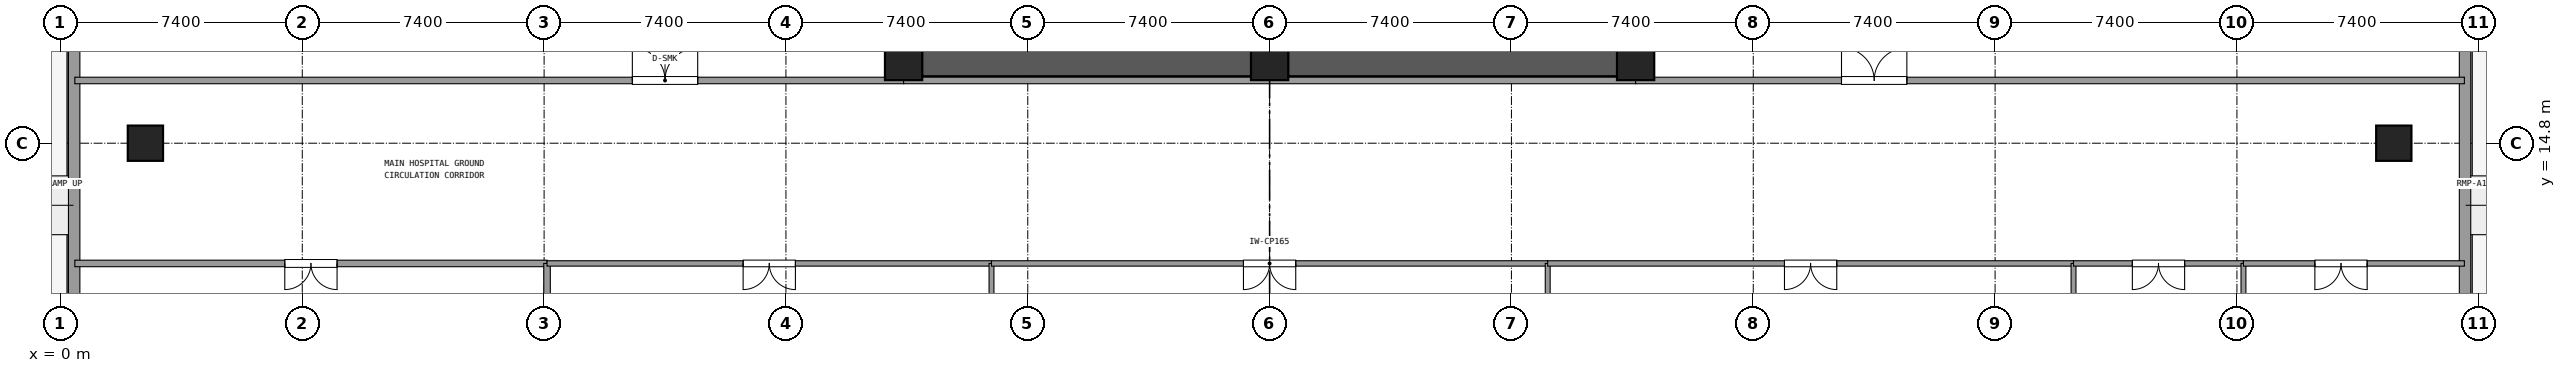
"""IFC4 building model, lengths in metres.
Left out: names, types, materials, properties, quantities, classifications, styles, units other than length and angle.
Written with IfcOpenShell. Run it as: python <this file> out.ifc"""

import sys

from ifc_helpers import new_model, si_unit, direction, frame, frame_2d, origin, origin_2d, place, context, subcontext, project, spatial, rectangle, extrude, element, fill, save


model = new_model("IFC4")
c1 = context("Model", 3, precision=1e-05, world=origin(), true_north=direction((0.0, 1.0)))
c2 = subcontext(c1, "Body", "Model", "MODEL_VIEW")
j1 = project(units=[si_unit("LENGTHUNIT", "METRE"), si_unit("PLANEANGLEUNIT", "RADIAN")], contexts=[c1])
p1 = place(None, origin())
s1 = spatial("IfcSite", under=j1, at=p1, CompositionType="ELEMENT")
p2 = place(p1, origin())
s2 = spatial("IfcBuilding", under=s1, at=p2, CompositionType="ELEMENT")
p3 = place(p2, origin())
s3 = spatial("IfcBuildingStorey", under=s2, at=p3, CompositionType="ELEMENT", Elevation=0.0)
for number, where, z_axis, x_axis in (
    (1, (25.8, 17.3, 0.0), (0.0, 0.0, 1.0), (1.0, 0.0, 0.0)),
    (2, (37.0, 17.3, 0.0), (0.0, 0.0, 1.0), (1.0, 0.0, 0.0)),
    (3, (48.2, 17.3, 0.0), (0.0, 0.0, 1.0), (1.0, 0.0, 0.0)),
):
    element("IfcColumn", number, at=place(p3, frame(where, z_axis=z_axis, x_axis=x_axis)), inside=s3, PredefinedType="COLUMN", context=c2, shape_type="SweptSolid", body=[
        extrude(rectangle(XDim=1.14, YDim=1.14, at=origin_2d()), origin(), (0.0, 0.0, 1.0), 5.4),
    ])
for number, where, z_axis, x_axis in (
    (4, (26.365, 17.3, 0.0), (0.0, 0.0, 1.0), (1.0, 0.0, 0.0)),
    (5, (37.565, 17.3, 0.0), (0.0, 0.0, 1.0), (1.0, 0.0, 0.0)),
):
    element("IfcWall", number, at=place(p3, frame(where, z_axis=z_axis, x_axis=x_axis)), inside=s3, PredefinedType="SHEAR", context=c2, shape_type="SweptSolid", body=[
        extrude(rectangle(XDim=10.07, YDim=0.9, at=frame_2d((5.035, 0.0))), origin(), (0.0, 0.0, 1.0), 5.1),
    ])
for number, where, z_axis, x_axis in (
    (6, (2.6, 14.8, 0.0), (0.0, 0.0, 1.0), (1.0, 0.0, 0.0)),
    (7, (71.4, 14.8, 0.0), (0.0, 0.0, 1.0), (1.0, 0.0, 0.0)),
):
    element("IfcColumn", number, at=place(p3, frame(where, z_axis=z_axis, x_axis=x_axis)), inside=s3, PredefinedType="COLUMN", context=c2, shape_type="SweptSolid", body=[
        extrude(rectangle(XDim=1.08, YDim=1.08, at=origin_2d()), origin(), (0.0, 0.0, 1.0), 5.4),
    ])
p4 = place(p3, frame((73.58, 4.379, 0.0), z_axis=(0.0, 0.0, 1.0), x_axis=(0.0, 1.0, 0.0)))
e8 = element("IfcWall", 8, at=p4, inside=s3, PredefinedType="SOLIDWALL", context=c2, shape_type="SweptSolid", body=[
    extrude(rectangle(XDim=43.042, YDim=0.35, at=frame_2d((21.521, 0.0))), origin(), (0.0, 0.0, 1.0), 4.14),
])
p5 = place(p4, frame((14.071, 0.0, 0.0)))
e9 = element("IfcOpeningElement", 9, at=p5, cuts=e8, PredefinedType="OPENING", context=c2, shape_type="SweptSolid", body=[
    extrude(rectangle(XDim=2.1, YDim=2.4, at=frame_2d((1.05, 1.2))), frame((0.0, 0.185, 0.0), z_axis=(0.0, -1.0, 0.0), x_axis=(1.0, 0.0, 0.0)), (0.0, 0.0, 1.0), 0.37),
])
p6 = place(p4, frame((37.121, 0.0, 0.0)))
e10 = element("IfcOpeningElement", 10, at=p6, cuts=e8, PredefinedType="OPENING", context=c2, shape_type="SweptSolid", body=[
    extrude(rectangle(XDim=3.8, YDim=2.85, at=frame_2d((1.9, 1.425))), frame((0.0, 0.185, 0.0), z_axis=(0.0, -1.0, 0.0), x_axis=(1.0, 0.0, 0.0)), (0.0, 0.0, 1.0), 0.37),
])
p7 = place(p3, frame((0.42, 47.421, 0.0), z_axis=(0.0, 0.0, 1.0), x_axis=(0.0, -1.0, 0.0)))
e11 = element("IfcWall", 11, at=p7, inside=s3, PredefinedType="SOLIDWALL", context=c2, shape_type="SweptSolid", body=[
    extrude(rectangle(XDim=43.042, YDim=0.35, at=frame_2d((21.521, 0.0))), origin(), (0.0, 0.0, 1.0), 4.14),
])
p8 = place(p7, frame((26.871, 0.0, 0.0)))
e12 = element("IfcOpeningElement", 12, at=p8, cuts=e11, PredefinedType="OPENING", context=c2, shape_type="SweptSolid", body=[
    extrude(rectangle(XDim=2.4, YDim=2.5, at=frame_2d((1.2, 1.25))), frame((0.0, 0.185, 0.0), z_axis=(0.0, -1.0, 0.0), x_axis=(1.0, 0.0, 0.0)), (0.0, 0.0, 1.0), 0.37),
])
p9 = place(p7, frame((2.5, 0.0, 1.2)))
e13 = element("IfcOpeningElement", 13, at=p9, cuts=e11, PredefinedType="OPENING", context=c2, shape_type="SweptSolid", body=[
    extrude(rectangle(XDim=2.2, YDim=1.6, at=frame_2d((1.1, 0.8))), frame((0.0, 0.185, 0.0), z_axis=(0.0, -1.0, 0.0), x_axis=(1.0, 0.0, 0.0)), (0.0, 0.0, 1.0), 0.37),
])
p10 = place(p3, frame((0.44, 16.72, 0.0), z_axis=(0.0, 0.0, 1.0), x_axis=(1.0, 0.0, 0.0)))
e14 = element("IfcWall", 14, at=p10, inside=s3, PredefinedType="SOLIDWALL", context=c2, shape_type="SweptSolid", body=[
    extrude(rectangle(XDim=25.36, YDim=0.2, at=frame_2d((12.68, 0.0))), origin(), (0.0, 0.0, 1.0), 4.11),
])
p11 = place(p10, frame((17.06, 0.0, 0.0)))
e15 = element("IfcOpeningElement", 15, at=p11, cuts=e14, PredefinedType="OPENING", context=c2, shape_type="SweptSolid", body=[
    extrude(rectangle(XDim=2.0, YDim=2.2, at=frame_2d((1.0, 1.1))), frame((0.0, 0.11, 0.0), z_axis=(0.0, -1.0, 0.0), x_axis=(1.0, 0.0, 0.0)), (0.0, 0.0, 1.0), 0.22),
])
p12 = place(p3, frame((25.8, 16.72, 0.0), z_axis=(0.0, 0.0, 1.0), x_axis=(1.0, 0.0, 0.0)))
e16 = element("IfcWall", 16, at=p12, inside=s3, PredefinedType="SOLIDWALL", context=c2, shape_type="SweptSolid", body=[
    extrude(rectangle(XDim=22.4, YDim=0.2, at=frame_2d((11.2, 0.0))), origin(), (0.0, 0.0, 1.0), 4.11),
])
p13 = place(p3, frame((48.2, 16.72, 0.0), z_axis=(0.0, 0.0, 1.0), x_axis=(1.0, 0.0, 0.0)))
e17 = element("IfcWall", 17, at=p13, inside=s3, PredefinedType="SOLIDWALL", context=c2, shape_type="SweptSolid", body=[
    extrude(rectangle(XDim=25.36, YDim=0.2, at=frame_2d((12.68, 0.0))), origin(), (0.0, 0.0, 1.0), 4.11),
])
p14 = place(p13, frame((6.3, 0.0, 0.0)))
e18 = element("IfcOpeningElement", 18, at=p14, cuts=e17, PredefinedType="OPENING", context=c2, shape_type="SweptSolid", body=[
    extrude(rectangle(XDim=2.0, YDim=2.2, at=frame_2d((1.0, 1.1))), frame((0.0, 0.11, 0.0), z_axis=(0.0, -1.0, 0.0), x_axis=(1.0, 0.0, 0.0)), (0.0, 0.0, 1.0), 0.22),
])
p15 = place(p3, frame((0.44, 11.12, 0.0), z_axis=(0.0, 0.0, 1.0), x_axis=(1.0, 0.0, 0.0)))
e19 = element("IfcWall", 19, at=p15, inside=s3, PredefinedType="SOLIDWALL", context=c2, shape_type="SweptSolid", body=[
    extrude(rectangle(XDim=14.45, YDim=0.2, at=frame_2d((7.225, 0.0))), origin(), (0.0, 0.0, 1.0), 4.11),
])
p16 = place(p15, frame((6.425, 0.0, 0.0)))
e20 = element("IfcOpeningElement", 20, at=p16, cuts=e19, PredefinedType="OPENING", context=c2, shape_type="SweptSolid", body=[
    extrude(rectangle(XDim=1.6, YDim=2.2, at=frame_2d((0.8, 1.1))), frame((0.0, 0.11, 0.0), z_axis=(0.0, -1.0, 0.0), x_axis=(1.0, 0.0, 0.0)), (0.0, 0.0, 1.0), 0.22),
])
p17 = place(p3, frame((14.89, 0.44, 0.0), z_axis=(0.0, 0.0, 1.0), x_axis=(0.0, 1.0, 0.0)))
e21 = element("IfcWall", 21, at=p17, inside=s3, PredefinedType="SOLIDWALL", context=c2, shape_type="SweptSolid", body=[
    extrude(rectangle(XDim=10.68, YDim=0.2, at=frame_2d((5.34, 0.0))), origin(), (0.0, 0.0, 1.0), 4.11),
])
p18 = place(p3, frame((14.89, 11.12, 0.0), z_axis=(0.0, 0.0, 1.0), x_axis=(1.0, 0.0, 0.0)))
e22 = element("IfcWall", 22, at=p18, inside=s3, PredefinedType="PARTITIONING", context=c2, shape_type="SweptSolid", body=[
    extrude(rectangle(XDim=13.6, YDim=0.165, at=frame_2d((6.8, 0.0))), origin(), (0.0, 0.0, 1.0), 4.11),
])
p19 = place(p18, frame((6.0, 0.0, 0.0)))
e23 = element("IfcOpeningElement", 23, at=p19, cuts=e22, PredefinedType="OPENING", context=c2, shape_type="SweptSolid", body=[
    extrude(rectangle(XDim=1.6, YDim=2.2, at=frame_2d((0.8, 1.1))), frame((0.0, 0.093, 0.0), z_axis=(0.0, -1.0, 0.0), x_axis=(1.0, 0.0, 0.0)), (0.0, 0.0, 1.0), 0.185),
])
p20 = place(p3, frame((28.49, 0.44, 0.0), z_axis=(0.0, 0.0, 1.0), x_axis=(0.0, 1.0, 0.0)))
e24 = element("IfcWall", 24, at=p20, inside=s3, PredefinedType="PARTITIONING", context=c2, shape_type="SweptSolid", body=[
    extrude(rectangle(XDim=10.68, YDim=0.15, at=frame_2d((5.34, 0.0))), origin(), (0.0, 0.0, 1.0), 4.11),
])
p21 = place(p3, frame((28.49, 11.12, 0.0), z_axis=(0.0, 0.0, 1.0), x_axis=(1.0, 0.0, 0.0)))
e25 = element("IfcWall", 25, at=p21, inside=s3, PredefinedType="PARTITIONING", context=c2, shape_type="SweptSolid", body=[
    extrude(rectangle(XDim=17.02, YDim=0.165, at=frame_2d((8.51, 0.0))), origin(), (0.0, 0.0, 1.0), 4.11),
])
p22 = place(p21, frame((7.71, 0.0, 0.0)))
e26 = element("IfcOpeningElement", 26, at=p22, cuts=e25, PredefinedType="OPENING", context=c2, shape_type="SweptSolid", body=[
    extrude(rectangle(XDim=1.6, YDim=2.2, at=frame_2d((0.8, 1.1))), frame((0.0, 0.093, 0.0), z_axis=(0.0, -1.0, 0.0), x_axis=(1.0, 0.0, 0.0)), (0.0, 0.0, 1.0), 0.185),
])
p23 = place(p3, frame((45.51, 0.44, 0.0), z_axis=(0.0, 0.0, 1.0), x_axis=(0.0, 1.0, 0.0)))
e27 = element("IfcWall", 27, at=p23, inside=s3, PredefinedType="PARTITIONING", context=c2, shape_type="SweptSolid", body=[
    extrude(rectangle(XDim=10.68, YDim=0.15, at=frame_2d((5.34, 0.0))), origin(), (0.0, 0.0, 1.0), 4.11),
])
p24 = place(p3, frame((45.51, 11.12, 0.0), z_axis=(0.0, 0.0, 1.0), x_axis=(1.0, 0.0, 0.0)))
e28 = element("IfcWall", 28, at=p24, inside=s3, PredefinedType="PARTITIONING", context=c2, shape_type="SweptSolid", body=[
    extrude(rectangle(XDim=16.09, YDim=0.165, at=frame_2d((8.045, 0.0))), origin(), (0.0, 0.0, 1.0), 4.11),
])
p25 = place(p24, frame((7.245, 0.0, 0.0)))
e29 = element("IfcOpeningElement", 29, at=p25, cuts=e28, PredefinedType="OPENING", context=c2, shape_type="SweptSolid", body=[
    extrude(rectangle(XDim=1.6, YDim=2.2, at=frame_2d((0.8, 1.1))), frame((0.0, 0.093, 0.0), z_axis=(0.0, -1.0, 0.0), x_axis=(1.0, 0.0, 0.0)), (0.0, 0.0, 1.0), 0.185),
])
p26 = place(p3, frame((61.6, 0.44, 0.0), z_axis=(0.0, 0.0, 1.0), x_axis=(0.0, 1.0, 0.0)))
e30 = element("IfcWall", 30, at=p26, inside=s3, PredefinedType="PARTITIONING", context=c2, shape_type="SweptSolid", body=[
    extrude(rectangle(XDim=10.68, YDim=0.15, at=frame_2d((5.34, 0.0))), origin(), (0.0, 0.0, 1.0), 4.11),
])
p27 = place(p3, frame((61.6, 11.12, 0.0), z_axis=(0.0, 0.0, 1.0), x_axis=(1.0, 0.0, 0.0)))
e31 = element("IfcWall", 31, at=p27, inside=s3, PredefinedType="PARTITIONING", context=c2, shape_type="SweptSolid", body=[
    extrude(rectangle(XDim=5.2, YDim=0.165, at=frame_2d((2.6, 0.0))), origin(), (0.0, 0.0, 1.0), 4.11),
])
p28 = place(p27, frame((1.8, 0.0, 0.0)))
e32 = element("IfcOpeningElement", 32, at=p28, cuts=e31, PredefinedType="OPENING", context=c2, shape_type="SweptSolid", body=[
    extrude(rectangle(XDim=1.6, YDim=2.2, at=frame_2d((0.8, 1.1))), frame((0.0, 0.093, 0.0), z_axis=(0.0, -1.0, 0.0), x_axis=(1.0, 0.0, 0.0)), (0.0, 0.0, 1.0), 0.185),
])
p29 = place(p3, frame((66.8, 0.44, 0.0), z_axis=(0.0, 0.0, 1.0), x_axis=(0.0, 1.0, 0.0)))
e33 = element("IfcWall", 33, at=p29, inside=s3, PredefinedType="PARTITIONING", context=c2, shape_type="SweptSolid", body=[
    extrude(rectangle(XDim=10.68, YDim=0.15, at=frame_2d((5.34, 0.0))), origin(), (0.0, 0.0, 1.0), 4.11),
])
p30 = place(p3, frame((66.8, 11.12, 0.0), z_axis=(0.0, 0.0, 1.0), x_axis=(1.0, 0.0, 0.0)))
e34 = element("IfcWall", 34, at=p30, inside=s3, PredefinedType="PARTITIONING", context=c2, shape_type="SweptSolid", body=[
    extrude(rectangle(XDim=6.76, YDim=0.165, at=frame_2d((3.38, 0.0))), origin(), (0.0, 0.0, 1.0), 4.11),
])
p31 = place(p30, frame((2.185, 0.0, 0.0)))
e35 = element("IfcOpeningElement", 35, at=p31, cuts=e34, PredefinedType="OPENING", context=c2, shape_type="SweptSolid", body=[
    extrude(rectangle(XDim=1.6, YDim=2.2, at=frame_2d((0.8, 1.1))), frame((0.0, 0.093, 0.0), z_axis=(0.0, -1.0, 0.0), x_axis=(1.0, 0.0, 0.0)), (0.0, 0.0, 1.0), 0.185),
])
p32 = place(p11, origin())
e36 = element("IfcDoor", 36, at=p32, inside=s3, OperationType="DOUBLE_DOOR_SINGLE_SWING", PredefinedType="DOOR", context=c2, shape_type="SweptSolid", body=[
    extrude(rectangle(XDim=2.0, YDim=2.2, at=frame_2d((1.0, 1.1))), frame((0.0, 0.025, 0.0), z_axis=(0.0, -1.0, 0.0), x_axis=(1.0, 0.0, 0.0)), (0.0, 0.0, 1.0), 0.05),
])
fill(e15, e36)
p33 = place(p14, origin())
e37 = element("IfcDoor", 37, at=p33, inside=s3, OperationType="DOUBLE_DOOR_SINGLE_SWING", PredefinedType="DOOR", context=c2, shape_type="SweptSolid", body=[
    extrude(rectangle(XDim=2.0, YDim=2.2, at=frame_2d((1.0, 1.1))), frame((0.0, 0.025, 0.0), z_axis=(0.0, -1.0, 0.0), x_axis=(1.0, 0.0, 0.0)), (0.0, 0.0, 1.0), 0.05),
])
fill(e18, e37)
p34 = place(p16, frame((1.6, 0.0, 0.0), z_axis=(0.0, 0.0, 1.0), x_axis=(-1.0, 0.0, 0.0)))
e38 = element("IfcDoor", 38, at=p34, inside=s3, OperationType="DOUBLE_DOOR_SINGLE_SWING", PredefinedType="DOOR", context=c2, shape_type="SweptSolid", body=[
    extrude(rectangle(XDim=1.6, YDim=2.2, at=frame_2d((0.8, 1.1))), frame((0.0, 0.025, 0.0), z_axis=(0.0, -1.0, 0.0), x_axis=(1.0, 0.0, 0.0)), (0.0, 0.0, 1.0), 0.05),
])
fill(e20, e38)
p35 = place(p19, frame((1.6, 0.0, 0.0), z_axis=(0.0, 0.0, 1.0), x_axis=(-1.0, 0.0, 0.0)))
e39 = element("IfcDoor", 39, at=p35, inside=s3, OperationType="DOUBLE_DOOR_SINGLE_SWING", PredefinedType="DOOR", context=c2, shape_type="SweptSolid", body=[
    extrude(rectangle(XDim=1.6, YDim=2.2, at=frame_2d((0.8, 1.1))), frame((0.0, 0.025, 0.0), z_axis=(0.0, -1.0, 0.0), x_axis=(1.0, 0.0, 0.0)), (0.0, 0.0, 1.0), 0.05),
])
fill(e23, e39)
p36 = place(p22, frame((1.6, 0.0, 0.0), z_axis=(0.0, 0.0, 1.0), x_axis=(-1.0, 0.0, 0.0)))
e40 = element("IfcDoor", 40, at=p36, inside=s3, OperationType="DOUBLE_DOOR_SINGLE_SWING", PredefinedType="DOOR", context=c2, shape_type="SweptSolid", body=[
    extrude(rectangle(XDim=1.6, YDim=2.2, at=frame_2d((0.8, 1.1))), frame((0.0, 0.025, 0.0), z_axis=(0.0, -1.0, 0.0), x_axis=(1.0, 0.0, 0.0)), (0.0, 0.0, 1.0), 0.05),
])
fill(e26, e40)
p37 = place(p25, frame((1.6, 0.0, 0.0), z_axis=(0.0, 0.0, 1.0), x_axis=(-1.0, 0.0, 0.0)))
e41 = element("IfcDoor", 41, at=p37, inside=s3, OperationType="DOUBLE_DOOR_SINGLE_SWING", PredefinedType="DOOR", context=c2, shape_type="SweptSolid", body=[
    extrude(rectangle(XDim=1.6, YDim=2.2, at=frame_2d((0.8, 1.1))), frame((0.0, 0.025, 0.0), z_axis=(0.0, -1.0, 0.0), x_axis=(1.0, 0.0, 0.0)), (0.0, 0.0, 1.0), 0.05),
])
fill(e29, e41)
p38 = place(p28, frame((1.6, 0.0, 0.0), z_axis=(0.0, 0.0, 1.0), x_axis=(-1.0, 0.0, 0.0)))
e42 = element("IfcDoor", 42, at=p38, inside=s3, OperationType="DOUBLE_DOOR_SINGLE_SWING", PredefinedType="DOOR", context=c2, shape_type="SweptSolid", body=[
    extrude(rectangle(XDim=1.6, YDim=2.2, at=frame_2d((0.8, 1.1))), frame((0.0, 0.025, 0.0), z_axis=(0.0, -1.0, 0.0), x_axis=(1.0, 0.0, 0.0)), (0.0, 0.0, 1.0), 0.05),
])
fill(e32, e42)
p39 = place(p31, frame((1.6, 0.0, 0.0), z_axis=(0.0, 0.0, 1.0), x_axis=(-1.0, 0.0, 0.0)))
e43 = element("IfcDoor", 43, at=p39, inside=s3, OperationType="DOUBLE_DOOR_SINGLE_SWING", PredefinedType="DOOR", context=c2, shape_type="SweptSolid", body=[
    extrude(rectangle(XDim=1.6, YDim=2.2, at=frame_2d((0.8, 1.1))), frame((0.0, 0.025, 0.0), z_axis=(0.0, -1.0, 0.0), x_axis=(1.0, 0.0, 0.0)), (0.0, 0.0, 1.0), 0.05),
])
fill(e35, e43)
save(model, sys.argv[1])
